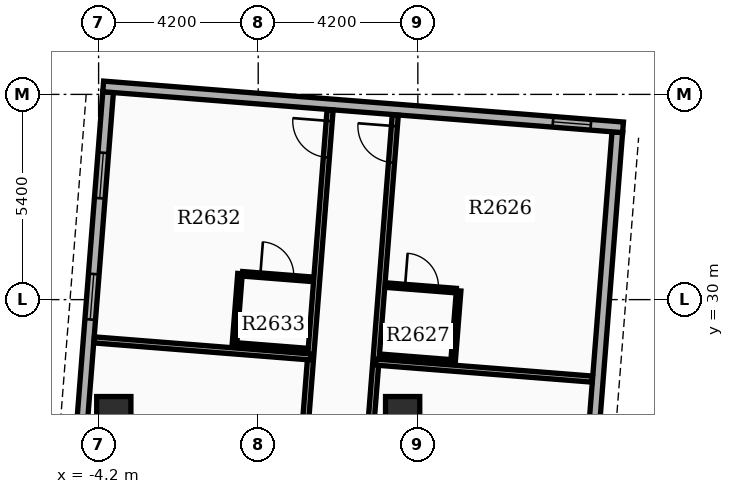
"""IFC4 building model, lengths in metres.
Left out: names, types, materials, properties, quantities, classifications, styles, units other than length and angle.
Written with IfcOpenShell. Run it as: python <this file> out.ifc"""

import sys

from ifc_helpers import new_model, si_unit, direction, frame, frame_2d, origin, origin_2d, place, context, subcontext, project, spatial, rectangle, extrude, element, fill, save


model = new_model("IFC4")
c1 = context("Model", 3, precision=1e-05, world=origin(), true_north=direction((0.0, 1.0)))
c2 = subcontext(c1, "Body", "Model", "MODEL_VIEW")
j1 = project(units=[si_unit("LENGTHUNIT", "METRE"), si_unit("PLANEANGLEUNIT", "RADIAN")], contexts=[c1])
p1 = place(None, origin())
s1 = spatial("IfcSite", under=j1, at=p1, CompositionType="ELEMENT")
p2 = place(p1, origin())
s2 = spatial("IfcBuilding", under=s1, at=p2, CompositionType="ELEMENT")
p3 = place(p2, frame((0.0, 0.0, 164.4)))
s3 = spatial("IfcBuildingStorey", under=s2, at=p3, CompositionType="ELEMENT", Elevation=164.4)
for number, where, z_axis, x_axis in (
    (1, (-3.8, 27.0, 0.0), (0.0, 0.0, 1.0), (1.0, 0.0, 0.0)),
    (2, (3.8, 27.0, 0.0), (0.0, 0.0, 1.0), (1.0, 0.0, 0.0)),
):
    element("IfcColumn", number, at=place(p3, frame(where, z_axis=z_axis, x_axis=x_axis)), inside=s3, PredefinedType="COLUMN", context=c2, shape_type="SweptSolid", body=[
        extrude(rectangle(XDim=0.9, YDim=0.9, at=origin_2d()), origin(), (0.0, 0.0, 1.0), 3.9),
    ])
p4 = place(p3, frame((7.872, 14.367, 0.0), z_axis=(0.0, 0.0, 1.0), x_axis=(0.078452802979, 0.996917828963, 0.0)))
e3 = element("IfcWall", 3, at=p4, inside=s3, PredefinedType="STANDARD", context=c2, shape_type="SweptSolid", body=[
    extrude(rectangle(XDim=20.1, YDim=0.28, at=frame_2d((10.05, 0.0))), origin(), (0.0, 0.0, 1.0), 2.97),
])
p5 = place(p4, frame((1.6, 0.0, 0.8)))
e4 = element("IfcOpeningElement", 4, at=p5, cuts=e3, PredefinedType="OPENING", context=c2, shape_type="SweptSolid", body=[
    extrude(rectangle(XDim=1.2, YDim=1.6, at=frame_2d((0.6, 0.8))), frame((0.0, 0.15, 0.0), z_axis=(0.0, -1.0, 0.0), x_axis=(1.0, 0.0, 0.0)), (0.0, 0.0, 1.0), 0.3),
])
p6 = place(p4, frame((4.8, 0.0, 0.8)))
e5 = element("IfcOpeningElement", 5, at=p6, cuts=e3, PredefinedType="OPENING", context=c2, shape_type="SweptSolid", body=[
    extrude(rectangle(XDim=1.2, YDim=1.6, at=frame_2d((0.6, 0.8))), frame((0.0, 0.15, 0.0), z_axis=(0.0, -1.0, 0.0), x_axis=(1.0, 0.0, 0.0)), (0.0, 0.0, 1.0), 0.3),
])
p7 = place(p4, frame((8.0, 0.0, 0.8)))
e6 = element("IfcOpeningElement", 6, at=p7, cuts=e3, PredefinedType="OPENING", context=c2, shape_type="SweptSolid", body=[
    extrude(rectangle(XDim=1.2, YDim=1.6, at=frame_2d((0.6, 0.8))), frame((0.0, 0.15, 0.0), z_axis=(0.0, -1.0, 0.0), x_axis=(1.0, 0.0, 0.0)), (0.0, 0.0, 1.0), 0.3),
])
p8 = place(p4, frame((11.2, 0.0, 0.8)))
e7 = element("IfcOpeningElement", 7, at=p8, cuts=e3, PredefinedType="OPENING", context=c2, shape_type="SweptSolid", body=[
    extrude(rectangle(XDim=1.2, YDim=1.6, at=frame_2d((0.6, 0.8))), frame((0.0, 0.15, 0.0), z_axis=(0.0, -1.0, 0.0), x_axis=(1.0, 0.0, 0.0)), (0.0, 0.0, 1.0), 0.3),
])
p9 = place(p3, frame((-3.95, 35.459, 0.0), z_axis=(0.0, 0.0, 1.0), x_axis=(-0.078452802979, -0.996917828963, 0.0)))
e8 = element("IfcWall", 8, at=p9, inside=s3, PredefinedType="STANDARD", context=c2, shape_type="SweptSolid", body=[
    extrude(rectangle(XDim=20.1, YDim=0.28, at=frame_2d((10.05, 0.0))), origin(), (0.0, 0.0, 1.0), 2.97),
])
p10 = place(p9, frame((1.6, 0.0, 0.8)))
e9 = element("IfcOpeningElement", 9, at=p10, cuts=e8, PredefinedType="OPENING", context=c2, shape_type="SweptSolid", body=[
    extrude(rectangle(XDim=1.2, YDim=1.6, at=frame_2d((0.6, 0.8))), frame((0.0, 0.15, 0.0), z_axis=(0.0, -1.0, 0.0), x_axis=(1.0, 0.0, 0.0)), (0.0, 0.0, 1.0), 0.3),
])
p11 = place(p9, frame((4.8, 0.0, 0.8)))
e10 = element("IfcOpeningElement", 10, at=p11, cuts=e8, PredefinedType="OPENING", context=c2, shape_type="SweptSolid", body=[
    extrude(rectangle(XDim=1.2, YDim=1.6, at=frame_2d((0.6, 0.8))), frame((0.0, 0.15, 0.0), z_axis=(0.0, -1.0, 0.0), x_axis=(1.0, 0.0, 0.0)), (0.0, 0.0, 1.0), 0.3),
])
p12 = place(p9, frame((9.5, 0.0, 0.8)))
e11 = element("IfcOpeningElement", 11, at=p12, cuts=e8, PredefinedType="OPENING", context=c2, shape_type="SweptSolid", body=[
    extrude(rectangle(XDim=1.2, YDim=1.6, at=frame_2d((0.6, 0.8))), frame((0.0, 0.15, 0.0), z_axis=(0.0, -1.0, 0.0), x_axis=(1.0, 0.0, 0.0)), (0.0, 0.0, 1.0), 0.3),
])
p13 = place(p9, frame((14.2, 0.0, 0.8)))
e12 = element("IfcOpeningElement", 12, at=p13, cuts=e8, PredefinedType="OPENING", context=c2, shape_type="SweptSolid", body=[
    extrude(rectangle(XDim=1.2, YDim=1.6, at=frame_2d((0.6, 0.8))), frame((0.0, 0.15, 0.0), z_axis=(0.0, -1.0, 0.0), x_axis=(1.0, 0.0, 0.0)), (0.0, 0.0, 1.0), 0.3),
])
p14 = place(p3, frame((9.599, 34.533, 0.0), z_axis=(0.0, 0.0, 1.0), x_axis=(-0.996916198482, 0.078473519122, 0.0)))
e13 = element("IfcWall", 13, at=p14, inside=s3, PredefinedType="STANDARD", context=c2, shape_type="SweptSolid", body=[
    extrude(rectangle(XDim=13.72, YDim=0.28, at=frame_2d((6.86, 0.0))), origin(), (0.0, 0.0, 1.0), 2.97),
])
p15 = place(p14, frame((0.85, 0.0, 0.85)))
e14 = element("IfcOpeningElement", 14, at=p15, cuts=e13, PredefinedType="OPENING", context=c2, shape_type="SweptSolid", body=[
    extrude(rectangle(XDim=1.0, YDim=1.5, at=frame_2d((0.5, 0.75))), frame((0.0, 0.15, 0.0), z_axis=(0.0, -1.0, 0.0), x_axis=(1.0, 0.0, 0.0)), (0.0, 0.0, 1.0), 0.3),
])
p16 = place(p3, frame((2.022, 14.737, 0.0), z_axis=(0.0, 0.0, 1.0), x_axis=(0.078461408156, 0.996917151738, 0.0)))
e15 = element("IfcWall", 15, at=p16, inside=s3, PredefinedType="PARTITIONING", context=c2, shape_type="SweptSolid", body=[
    extrude(rectangle(XDim=20.182, YDim=0.16, at=frame_2d((10.091, 0.0))), origin(), (0.0, 0.0, 1.0), 2.96),
])
p17 = place(p16, frame((2.641, 0.0, 0.0)))
e16 = element("IfcOpeningElement", 16, at=p17, cuts=e15, PredefinedType="OPENING", context=c2, shape_type="SweptSolid", body=[
    extrude(rectangle(XDim=0.96, YDim=2.15, at=frame_2d((0.48, 1.075))), frame((0.0, 0.09, 0.0), z_axis=(0.0, -1.0, 0.0), x_axis=(1.0, 0.0, 0.0)), (0.0, 0.0, 1.0), 0.18),
])
p18 = place(p16, frame((9.293, 0.0, 0.0)))
e17 = element("IfcOpeningElement", 17, at=p18, cuts=e15, PredefinedType="OPENING", context=c2, shape_type="SweptSolid", body=[
    extrude(rectangle(XDim=0.96, YDim=2.15, at=frame_2d((0.48, 1.075))), frame((0.0, 0.09, 0.0), z_axis=(0.0, -1.0, 0.0), x_axis=(1.0, 0.0, 0.0)), (0.0, 0.0, 1.0), 0.18),
])
p19 = place(p16, frame((18.93, 0.0, 0.0)))
e18 = element("IfcOpeningElement", 18, at=p19, cuts=e15, PredefinedType="OPENING", context=c2, shape_type="SweptSolid", body=[
    extrude(rectangle(XDim=0.96, YDim=2.15, at=frame_2d((0.48, 1.075))), frame((0.0, 0.09, 0.0), z_axis=(0.0, -1.0, 0.0), x_axis=(1.0, 0.0, 0.0)), (0.0, 0.0, 1.0), 0.18),
])
p20 = place(p3, frame((3.094, 28.357, 0.0), z_axis=(0.0, 0.0, 1.0), x_axis=(0.996916125428, -0.078474447191, 0.0)))
e19 = element("IfcWall", 19, at=p20, inside=s3, PredefinedType="PARTITIONING", context=c2, shape_type="SweptSolid", body=[
    extrude(rectangle(XDim=5.712, YDim=0.16, at=frame_2d((2.856, 0.0))), origin(), (0.0, 0.0, 1.0), 2.96),
])
p21 = place(p3, frame((3.394, 30.379, 0.0), z_axis=(0.0, 0.0, 1.0), x_axis=(0.996916400774, -0.0784709492, 0.0)))
e20 = element("IfcWall", 20, at=p21, inside=s3, PredefinedType="PARTITIONING", context=c2, shape_type="SweptSolid", body=[
    extrude(rectangle(XDim=1.82, YDim=0.12, at=frame_2d((0.91, 0.0))), origin(), (0.0, 0.0, 1.0), 2.96),
])
p22 = place(p21, frame((0.47, 0.0, 0.0)))
e21 = element("IfcOpeningElement", 21, at=p22, cuts=e20, PredefinedType="OPENING", context=c2, shape_type="SweptSolid", body=[
    extrude(rectangle(XDim=0.88, YDim=2.1, at=frame_2d((0.44, 1.05))), frame((0.0, 0.07, 0.0), z_axis=(0.0, -1.0, 0.0), x_axis=(1.0, 0.0, 0.0)), (0.0, 0.0, 1.0), 0.14),
])
p23 = place(p3, frame((3.247, 28.505, 0.0), z_axis=(0.0, 0.0, 1.0), x_axis=(0.996915574626, -0.078481444107, 0.0)))
e22 = element("IfcWall", 22, at=p23, inside=s3, PredefinedType="PARTITIONING", context=c2, shape_type="SweptSolid", body=[
    extrude(rectangle(XDim=1.82, YDim=0.12, at=frame_2d((0.91, 0.0))), origin(), (0.0, 0.0, 1.0), 2.96),
])
p24 = place(p3, frame((5.126, 28.357, 0.0), z_axis=(0.0, 0.0, 1.0), x_axis=(0.078444342213, 0.99691849475, 0.0)))
e23 = element("IfcWall", 23, at=p24, inside=s3, PredefinedType="PARTITIONING", context=c2, shape_type="SweptSolid", body=[
    extrude(rectangle(XDim=1.88, YDim=0.12, at=frame_2d((0.94, 0.0))), origin(), (0.0, 0.0, 1.0), 2.96),
])
p25 = place(p3, frame((0.308, 14.872, 0.0), z_axis=(0.0, 0.0, 1.0), x_axis=(0.0784484395, 0.996918172339, 0.0)))
e24 = element("IfcWall", 24, at=p25, inside=s3, PredefinedType="PARTITIONING", context=c2, shape_type="SweptSolid", body=[
    extrude(rectangle(XDim=20.182, YDim=0.16, at=frame_2d((10.091, 0.0))), origin(), (0.0, 0.0, 1.0), 2.96),
])
p26 = place(p25, frame((2.641, 0.0, 0.0)))
e25 = element("IfcOpeningElement", 25, at=p26, cuts=e24, PredefinedType="OPENING", context=c2, shape_type="SweptSolid", body=[
    extrude(rectangle(XDim=0.96, YDim=2.15, at=frame_2d((0.48, 1.075))), frame((0.0, 0.09, 0.0), z_axis=(0.0, -1.0, 0.0), x_axis=(1.0, 0.0, 0.0)), (0.0, 0.0, 1.0), 0.18),
])
p27 = place(p25, frame((9.293, 0.0, 0.0)))
e26 = element("IfcOpeningElement", 26, at=p27, cuts=e24, PredefinedType="OPENING", context=c2, shape_type="SweptSolid", body=[
    extrude(rectangle(XDim=0.96, YDim=2.15, at=frame_2d((0.48, 1.075))), frame((0.0, 0.09, 0.0), z_axis=(0.0, -1.0, 0.0), x_axis=(1.0, 0.0, 0.0)), (0.0, 0.0, 1.0), 0.18),
])
p28 = place(p25, frame((18.93, 0.0, 0.0)))
e27 = element("IfcOpeningElement", 27, at=p28, cuts=e24, PredefinedType="OPENING", context=c2, shape_type="SweptSolid", body=[
    extrude(rectangle(XDim=0.96, YDim=2.15, at=frame_2d((0.48, 1.075))), frame((0.0, 0.09, 0.0), z_axis=(0.0, -1.0, 0.0), x_axis=(1.0, 0.0, 0.0)), (0.0, 0.0, 1.0), 0.18),
])
p29 = place(p3, frame((1.38, 28.492, 0.0), z_axis=(0.0, 0.0, 1.0), x_axis=(-0.996919468351, 0.07843196812, 0.0)))
e28 = element("IfcWall", 28, at=p29, inside=s3, PredefinedType="PARTITIONING", context=c2, shape_type="SweptSolid", body=[
    extrude(rectangle(XDim=5.712, YDim=0.16, at=frame_2d((2.856, 0.0))), origin(), (0.0, 0.0, 1.0), 2.96),
])
p30 = place(p3, frame((-0.414, 30.679, 0.0), z_axis=(0.0, 0.0, 1.0), x_axis=(0.996916400774, -0.0784709492, 0.0)))
e29 = element("IfcWall", 29, at=p30, inside=s3, PredefinedType="PARTITIONING", context=c2, shape_type="SweptSolid", body=[
    extrude(rectangle(XDim=1.82, YDim=0.12, at=frame_2d((0.91, 0.0))), origin(), (0.0, 0.0, 1.0), 2.96),
])
p31 = place(p30, frame((0.47, 0.0, 0.0)))
e30 = element("IfcOpeningElement", 30, at=p31, cuts=e29, PredefinedType="OPENING", context=c2, shape_type="SweptSolid", body=[
    extrude(rectangle(XDim=0.88, YDim=2.1, at=frame_2d((0.44, 1.05))), frame((0.0, 0.07, 0.0), z_axis=(0.0, -1.0, 0.0), x_axis=(1.0, 0.0, 0.0)), (0.0, 0.0, 1.0), 0.14),
])
p32 = place(p3, frame((-0.562, 28.805, 0.0), z_axis=(0.0, 0.0, 1.0), x_axis=(0.996916400774, -0.0784709492, 0.0)))
e31 = element("IfcWall", 31, at=p32, inside=s3, PredefinedType="PARTITIONING", context=c2, shape_type="SweptSolid", body=[
    extrude(rectangle(XDim=1.82, YDim=0.12, at=frame_2d((0.91, 0.0))), origin(), (0.0, 0.0, 1.0), 2.96),
])
p33 = place(p3, frame((-0.626, 28.81, 0.0), z_axis=(0.0, 0.0, 1.0), x_axis=(0.078444342213, 0.99691849475, 0.0)))
e32 = element("IfcWall", 32, at=p33, inside=s3, PredefinedType="PARTITIONING", context=c2, shape_type="SweptSolid", body=[
    extrude(rectangle(XDim=1.88, YDim=0.12, at=frame_2d((0.94, 0.0))), origin(), (0.0, 0.0, 1.0), 2.96),
])
p34 = place(p10, origin())
e33 = element("IfcWindow", 33, at=p34, inside=s3, PartitioningType="SINGLE_PANEL", PredefinedType="WINDOW", context=c2, shape_type="SweptSolid", body=[
    extrude(rectangle(XDim=1.2, YDim=1.6, at=frame_2d((0.6, 0.8))), frame((0.0, 0.03, 0.0), z_axis=(0.0, -1.0, 0.0), x_axis=(1.0, 0.0, 0.0)), (0.0, 0.0, 1.0), 0.06),
])
fill(e9, e33)
p35 = place(p11, origin())
e34 = element("IfcWindow", 34, at=p35, inside=s3, PartitioningType="SINGLE_PANEL", PredefinedType="WINDOW", context=c2, shape_type="SweptSolid", body=[
    extrude(rectangle(XDim=1.2, YDim=1.6, at=frame_2d((0.6, 0.8))), frame((0.0, 0.03, 0.0), z_axis=(0.0, -1.0, 0.0), x_axis=(1.0, 0.0, 0.0)), (0.0, 0.0, 1.0), 0.06),
])
fill(e10, e34)
p36 = place(p15, origin())
e35 = element("IfcWindow", 35, at=p36, inside=s3, PartitioningType="SINGLE_PANEL", PredefinedType="WINDOW", context=c2, shape_type="SweptSolid", body=[
    extrude(rectangle(XDim=1.0, YDim=1.5, at=frame_2d((0.5, 0.75))), frame((0.0, 0.03, 0.0), z_axis=(0.0, -1.0, 0.0), x_axis=(1.0, 0.0, 0.0)), (0.0, 0.0, 1.0), 0.06),
])
fill(e14, e35)
p37 = place(p19, origin())
e36 = element("IfcDoor", 36, at=p37, inside=s3, OperationType="SINGLE_SWING_RIGHT", PredefinedType="DOOR", context=c2, shape_type="SweptSolid", body=[
    extrude(rectangle(XDim=0.96, YDim=2.15, at=frame_2d((0.48, 1.075))), frame((0.0, 0.025, 0.0), z_axis=(0.0, -1.0, 0.0), x_axis=(1.0, 0.0, 0.0)), (0.0, 0.0, 1.0), 0.05),
])
fill(e18, e36)
p38 = place(p22, origin())
e37 = element("IfcDoor", 37, at=p38, inside=s3, OperationType="SINGLE_SWING_LEFT", PredefinedType="DOOR", context=c2, shape_type="SweptSolid", body=[
    extrude(rectangle(XDim=0.88, YDim=2.1, at=frame_2d((0.44, 1.05))), frame((0.0, 0.025, 0.0), z_axis=(0.0, -1.0, 0.0), x_axis=(1.0, 0.0, 0.0)), (0.0, 0.0, 1.0), 0.05),
])
fill(e21, e37)
p39 = place(p28, origin())
e38 = element("IfcDoor", 38, at=p39, inside=s3, OperationType="SINGLE_SWING_RIGHT", PredefinedType="DOOR", context=c2, shape_type="SweptSolid", body=[
    extrude(rectangle(XDim=0.96, YDim=2.15, at=frame_2d((0.48, 1.075))), frame((0.0, 0.025, 0.0), z_axis=(0.0, -1.0, 0.0), x_axis=(1.0, 0.0, 0.0)), (0.0, 0.0, 1.0), 0.05),
])
fill(e27, e38)
p40 = place(p31, origin())
e39 = element("IfcDoor", 39, at=p40, inside=s3, OperationType="SINGLE_SWING_LEFT", PredefinedType="DOOR", context=c2, shape_type="SweptSolid", body=[
    extrude(rectangle(XDim=0.88, YDim=2.1, at=frame_2d((0.44, 1.05))), frame((0.0, 0.025, 0.0), z_axis=(0.0, -1.0, 0.0), x_axis=(1.0, 0.0, 0.0)), (0.0, 0.0, 1.0), 0.05),
])
fill(e30, e39)
save(model, sys.argv[1])
